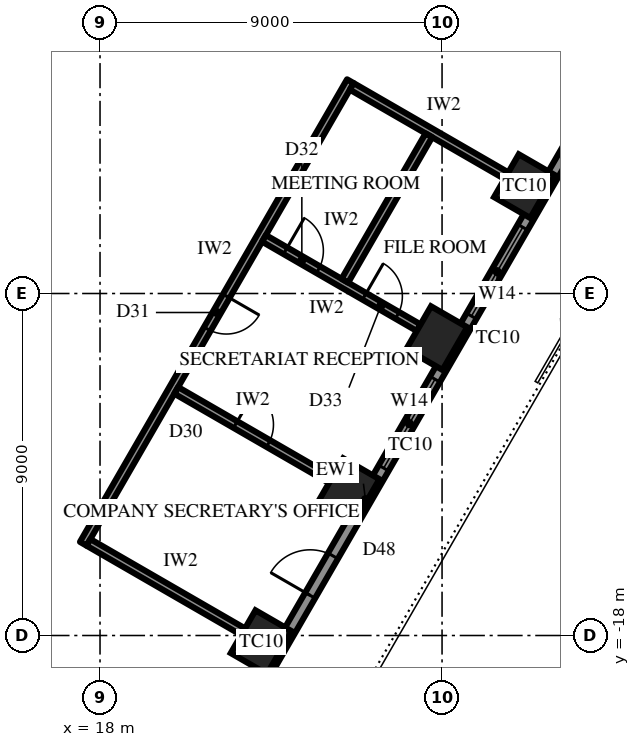
"""IFC4 building model, lengths in metres.
Left out: names, types, materials, properties, quantities, classifications, styles, units other than length and angle.
Written with IfcOpenShell. Run it as: python <this file> out.ifc"""

import sys

from ifc_helpers import new_model, si_unit, direction, frame, frame_2d, origin, origin_2d, place, context, subcontext, project, spatial, rectangle, extrude, element, fill, save


model = new_model("IFC4")
c1 = context("Model", 3, precision=1e-05, world=origin(), true_north=direction((0.0, 1.0)))
c2 = subcontext(c1, "Body", "Model", "MODEL_VIEW")
j1 = project(units=[si_unit("LENGTHUNIT", "METRE"), si_unit("PLANEANGLEUNIT", "RADIAN")], contexts=[c1])
p1 = place(None, origin())
s1 = spatial("IfcSite", under=j1, at=p1, CompositionType="ELEMENT")
p2 = place(p1, origin())
s2 = spatial("IfcBuilding", under=s1, at=p2, CompositionType="ELEMENT")
p3 = place(p2, frame((0.0, 0.0, 244.9)))
s3 = spatial("IfcBuildingStorey", under=s2, at=p3, CompositionType="ELEMENT", Elevation=244.9)
for number, where, z_axis, x_axis in (
    (1, (22.242, -18.175, 0.0), (0.0, 0.0, 1.0), (0.5, 0.866, 0.0)),
    (2, (24.552, -14.175, 0.0), (0.0, 0.0, 1.0), (0.5, 0.866, 0.0)),
    (3, (26.861, -10.175, 0.0), (0.0, 0.0, 1.0), (0.5, 0.866, 0.0)),
    (4, (29.171, -6.175, 0.0), (0.0, 0.0, 1.0), (0.5, 0.866, 0.0)),
):
    element("IfcColumn", number, at=place(p3, frame(where, z_axis=z_axis, x_axis=x_axis)), inside=s3, PredefinedType="COLUMN", context=c2, shape_type="SweptSolid", body=[
        extrude(rectangle(XDim=1.3, YDim=1.1, at=origin_2d()), origin(), (0.0, 0.0, 1.0), 4.2),
    ])
p4 = place(p3, frame((18.707, -25.299, 0.0), z_axis=(0.0, 0.0, 1.0), x_axis=(0.500000442367, 0.866025148383, 0.0)))
e5 = element("IfcWall", 5, at=p4, inside=s3, PredefinedType="SOLIDWALL", context=c2, shape_type="SweptSolid", body=[
    extrude(rectangle(XDim=25.113, YDim=0.3, at=frame_2d((12.556, 0.0))), origin(), (0.0, 0.0, 1.0), 2.8),
])
p5 = place(p4, frame((4.278, 0.0, 0.6)))
e6 = element("IfcOpeningElement", 6, at=p5, cuts=e5, PredefinedType="OPENING", context=c2, shape_type="SweptSolid", body=[
    extrude(rectangle(XDim=2.7, YDim=1.95, at=frame_2d((1.35, 0.975))), frame((0.0, 0.16, 0.0), z_axis=(0.0, -1.0, 0.0), x_axis=(1.0, 0.0, 0.0)), (0.0, 0.0, 1.0), 0.32),
])
p6 = place(p4, frame((9.647, 0.0, 0.0)))
e7 = element("IfcOpeningElement", 7, at=p6, cuts=e5, PredefinedType="OPENING", context=c2, shape_type="SweptSolid", body=[
    extrude(rectangle(XDim=1.2, YDim=2.4, at=frame_2d((0.6, 1.2))), frame((0.0, 0.16, 0.0), z_axis=(0.0, -1.0, 0.0), x_axis=(1.0, 0.0, 0.0)), (0.0, 0.0, 1.0), 0.32),
])
p7 = place(p4, frame((13.516, 0.0, 0.6)))
e8 = element("IfcOpeningElement", 8, at=p7, cuts=e5, PredefinedType="OPENING", context=c2, shape_type="SweptSolid", body=[
    extrude(rectangle(XDim=2.7, YDim=1.95, at=frame_2d((1.35, 0.975))), frame((0.0, 0.16, 0.0), z_axis=(0.0, -1.0, 0.0), x_axis=(1.0, 0.0, 0.0)), (0.0, 0.0, 1.0), 0.32),
])
p8 = place(p4, frame((18.135, 0.0, 0.6)))
e9 = element("IfcOpeningElement", 9, at=p8, cuts=e5, PredefinedType="OPENING", context=c2, shape_type="SweptSolid", body=[
    extrude(rectangle(XDim=2.7, YDim=1.95, at=frame_2d((1.35, 0.975))), frame((0.0, 0.16, 0.0), z_axis=(0.0, -1.0, 0.0), x_axis=(1.0, 0.0, 0.0)), (0.0, 0.0, 1.0), 0.32),
])
p9 = place(p3, frame((17.559, -15.587, 0.0), z_axis=(0.0, 0.0, 1.0), x_axis=(0.500002095642, 0.866024193862, 0.0)))
e10 = element("IfcWall", 10, at=p9, inside=s3, PredefinedType="PARTITIONING", context=c2, shape_type="SweptSolid", body=[
    extrude(rectangle(XDim=14.057, YDim=0.2, at=frame_2d((7.028, 0.0))), origin(), (0.0, 0.0, 1.0), 4.0),
])
p10 = place(p9, frame((6.528, 0.0, 0.0)))
e11 = element("IfcOpeningElement", 11, at=p10, cuts=e10, PredefinedType="OPENING", context=c2, shape_type="SweptSolid", body=[
    extrude(rectangle(XDim=1.0, YDim=2.2, at=frame_2d((0.5, 1.1))), frame((0.0, 0.11, 0.0), z_axis=(0.0, -1.0, 0.0), x_axis=(1.0, 0.0, 0.0)), (0.0, 0.0, 1.0), 0.22),
])
p11 = place(p3, frame((17.696, -15.55, 0.0), z_axis=(0.0, 0.0, 1.0), x_axis=(0.866038532462, -0.499977259774, 0.0)))
e12 = element("IfcWall", 12, at=p11, inside=s3, PredefinedType="PARTITIONING", context=c2, shape_type="SweptSolid", body=[
    extrude(rectangle(XDim=4.7, YDim=0.2, at=frame_2d((2.35, 0.0))), origin(), (0.0, 0.0, 1.0), 3.082),
])
p12 = place(p3, frame((20.005, -11.55, 0.0), z_axis=(0.0, 0.0, 1.0), x_axis=(0.866038532462, -0.499977259774, 0.0)))
e13 = element("IfcWall", 13, at=p12, inside=s3, PredefinedType="PARTITIONING", context=c2, shape_type="SweptSolid", body=[
    extrude(rectangle(XDim=4.7, YDim=0.2, at=frame_2d((2.35, 0.0))), origin(), (0.0, 0.0, 1.0), 3.082),
])
p13 = place(p12, frame((1.8, 0.0, 0.0)))
e14 = element("IfcOpeningElement", 14, at=p13, cuts=e13, PredefinedType="OPENING", context=c2, shape_type="SweptSolid", body=[
    extrude(rectangle(XDim=1.0, YDim=2.2, at=frame_2d((0.5, 1.1))), frame((0.0, 0.11, 0.0), z_axis=(0.0, -1.0, 0.0), x_axis=(1.0, 0.0, 0.0)), (0.0, 0.0, 1.0), 0.22),
])
p14 = place(p3, frame((22.315, -7.55, 0.0), z_axis=(0.0, 0.0, 1.0), x_axis=(0.866038532462, -0.499977259774, 0.0)))
e15 = element("IfcWall", 15, at=p14, inside=s3, PredefinedType="PARTITIONING", context=c2, shape_type="SweptSolid", body=[
    extrude(rectangle(XDim=4.7, YDim=0.2, at=frame_2d((2.35, 0.0))), origin(), (0.0, 0.0, 1.0), 3.082),
])
p15 = place(p14, frame((0.65, 0.0, 0.0)))
e16 = element("IfcOpeningElement", 16, at=p15, cuts=e15, PredefinedType="OPENING", context=c2, shape_type="SweptSolid", body=[
    extrude(rectangle(XDim=1.0, YDim=2.2, at=frame_2d((0.5, 1.1))), frame((0.0, 0.11, 0.0), z_axis=(0.0, -1.0, 0.0), x_axis=(1.0, 0.0, 0.0)), (0.0, 0.0, 1.0), 0.22),
])
p16 = place(p14, frame((3.05, 0.0, 0.0)))
e17 = element("IfcOpeningElement", 17, at=p16, cuts=e15, PredefinedType="OPENING", context=c2, shape_type="SweptSolid", body=[
    extrude(rectangle(XDim=1.0, YDim=2.2, at=frame_2d((0.5, 1.1))), frame((0.0, 0.11, 0.0), z_axis=(0.0, -1.0, 0.0), x_axis=(1.0, 0.0, 0.0)), (0.0, 0.0, 1.0), 0.22),
])
p17 = place(p3, frame((24.624, -3.55, 0.0), z_axis=(0.0, 0.0, 1.0), x_axis=(0.866038532462, -0.499977259774, 0.0)))
e18 = element("IfcWall", 18, at=p17, inside=s3, PredefinedType="PARTITIONING", context=c2, shape_type="SweptSolid", body=[
    extrude(rectangle(XDim=4.7, YDim=0.2, at=frame_2d((2.35, 0.0))), origin(), (0.0, 0.0, 1.0), 3.082),
])
p18 = place(p3, frame((24.443, -8.663, 0.0), z_axis=(0.0, 0.0, 1.0), x_axis=(0.499983916363, 0.866034689477, 0.0)))
e19 = element("IfcWall", 19, at=p18, inside=s3, PredefinedType="PARTITIONING", context=c2, shape_type="SweptSolid", body=[
    extrude(rectangle(XDim=4.419, YDim=0.2, at=frame_2d((2.209, 0.0))), origin(), (0.0, 0.0, 1.0), 4.0),
])
p19 = place(p6, origin())
e20 = element("IfcDoor", 20, at=p19, inside=s3, OperationType="SINGLE_SWING_RIGHT", PredefinedType="DOOR", context=c2, shape_type="SweptSolid", body=[
    extrude(rectangle(XDim=1.2, YDim=2.4, at=frame_2d((0.6, 1.2))), frame((0.0, 0.025, 0.0), z_axis=(0.0, -1.0, 0.0), x_axis=(1.0, 0.0, 0.0)), (0.0, 0.0, 1.0), 0.05),
])
fill(e7, e20)
p20 = place(p7, origin())
e21 = element("IfcWindow", 21, at=p20, inside=s3, PartitioningType="SINGLE_PANEL", PredefinedType="WINDOW", context=c2, shape_type="SweptSolid", body=[
    extrude(rectangle(XDim=2.7, YDim=1.95, at=frame_2d((1.35, 0.975))), frame((0.0, 0.03, 0.0), z_axis=(0.0, -1.0, 0.0), x_axis=(1.0, 0.0, 0.0)), (0.0, 0.0, 1.0), 0.06),
])
fill(e8, e21)
p21 = place(p8, origin())
e22 = element("IfcWindow", 22, at=p21, inside=s3, PartitioningType="SINGLE_PANEL", PredefinedType="WINDOW", context=c2, shape_type="SweptSolid", body=[
    extrude(rectangle(XDim=2.7, YDim=1.95, at=frame_2d((1.35, 0.975))), frame((0.0, 0.03, 0.0), z_axis=(0.0, -1.0, 0.0), x_axis=(1.0, 0.0, 0.0)), (0.0, 0.0, 1.0), 0.06),
])
fill(e9, e22)
p22 = place(p13, origin())
e23 = element("IfcDoor", 23, at=p22, inside=s3, OperationType="SINGLE_SWING_RIGHT", PredefinedType="DOOR", context=c2, shape_type="SweptSolid", body=[
    extrude(rectangle(XDim=1.0, YDim=2.2, at=frame_2d((0.5, 1.1))), frame((0.0, 0.025, 0.0), z_axis=(0.0, -1.0, 0.0), x_axis=(1.0, 0.0, 0.0)), (0.0, 0.0, 1.0), 0.05),
])
fill(e14, e23)
p23 = place(p10, frame((1.0, 0.0, 0.0), z_axis=(0.0, 0.0, 1.0), x_axis=(-1.0, 0.0, 0.0)))
e24 = element("IfcDoor", 24, at=p23, inside=s3, OperationType="SINGLE_SWING_RIGHT", PredefinedType="DOOR", context=c2, shape_type="SweptSolid", body=[
    extrude(rectangle(XDim=1.0, YDim=2.2, at=frame_2d((0.5, 1.1))), frame((0.0, 0.025, 0.0), z_axis=(0.0, -1.0, 0.0), x_axis=(1.0, 0.0, 0.0)), (0.0, 0.0, 1.0), 0.05),
])
fill(e11, e24)
p24 = place(p15, origin())
e25 = element("IfcDoor", 25, at=p24, inside=s3, OperationType="SINGLE_SWING_RIGHT", PredefinedType="DOOR", context=c2, shape_type="SweptSolid", body=[
    extrude(rectangle(XDim=1.0, YDim=2.2, at=frame_2d((0.5, 1.1))), frame((0.0, 0.025, 0.0), z_axis=(0.0, -1.0, 0.0), x_axis=(1.0, 0.0, 0.0)), (0.0, 0.0, 1.0), 0.05),
])
fill(e16, e25)
p25 = place(p16, origin())
e26 = element("IfcDoor", 26, at=p25, inside=s3, OperationType="SINGLE_SWING_RIGHT", PredefinedType="DOOR", context=c2, shape_type="SweptSolid", body=[
    extrude(rectangle(XDim=1.0, YDim=2.2, at=frame_2d((0.5, 1.1))), frame((0.0, 0.025, 0.0), z_axis=(0.0, -1.0, 0.0), x_axis=(1.0, 0.0, 0.0)), (0.0, 0.0, 1.0), 0.05),
])
fill(e17, e26)
save(model, sys.argv[1])
